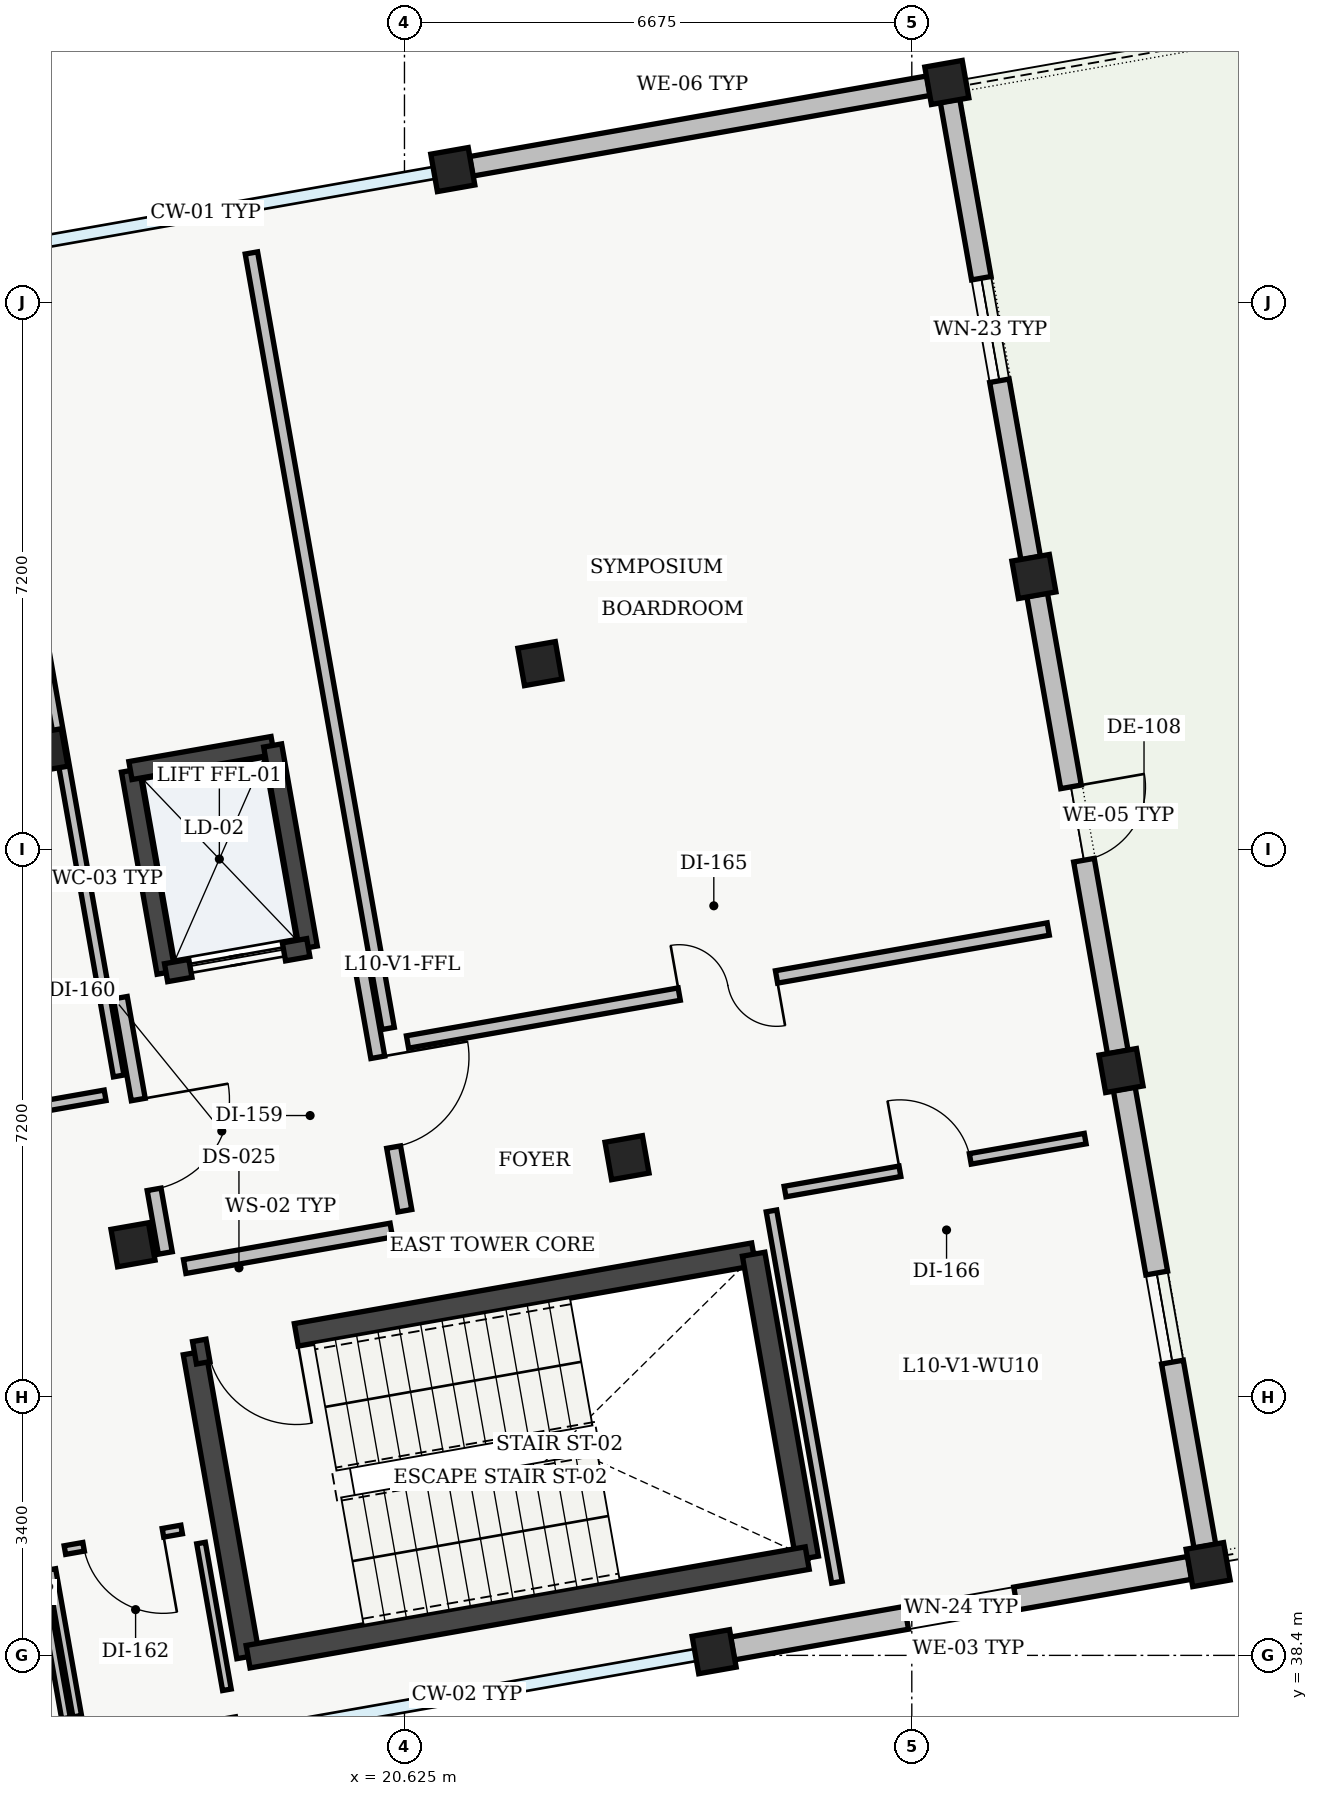
"""IFC4 building model, lengths in metres.
Left out: names, types, materials, properties, quantities, classifications, styles, units other than length and angle.
Written with IfcOpenShell. Run it as: python <this file> out.ifc"""

import sys

from ifc_helpers import new_model, si_unit, direction, frame, frame_2d, origin, origin_2d, place, context, subcontext, project, spatial, rectangle, extrude, element, fill, save


model = new_model("IFC4")
c1 = context("Model", 3, precision=1e-05, world=origin(), true_north=direction((0.0, 1.0)))
c2 = subcontext(c1, "Body", "Model", "MODEL_VIEW")
j1 = project(units=[si_unit("LENGTHUNIT", "METRE"), si_unit("PLANEANGLEUNIT", "RADIAN")], contexts=[c1])
p1 = place(None, origin())
s1 = spatial("IfcSite", under=j1, at=p1, CompositionType="ELEMENT")
p2 = place(p1, origin())
s2 = spatial("IfcBuilding", under=s1, at=p2, CompositionType="ELEMENT")
p3 = place(p2, frame((0.0, 0.0, 45.0)))
s3 = spatial("IfcBuildingStorey", under=s2, at=p3, CompositionType="ELEMENT", Elevation=45.0)
for number, where, z_axis, x_axis in (
    (1, (17.053, 43.802, 0.0), (0.0, 0.0, 1.0), (0.985, 0.174, 0.0)),
    (2, (15.907, 50.302, 0.0), (0.0, 0.0, 1.0), (0.985, 0.174, 0.0)),
    (3, (24.699, 38.448, 0.0), (0.0, 0.0, 1.0), (0.985, 0.174, 0.0)),
    (4, (23.553, 44.948, 0.0), (0.0, 0.0, 1.0), (0.985, 0.174, 0.0)),
    (5, (22.407, 51.448, 0.0), (0.0, 0.0, 1.0), (0.985, 0.174, 0.0)),
    (6, (21.261, 57.948, 0.0), (0.0, 0.0, 1.0), (0.985, 0.174, 0.0)),
    (7, (31.199, 39.594, 0.0), (0.0, 0.0, 1.0), (0.985, 0.174, 0.0)),
    (8, (30.053, 46.094, 0.0), (0.0, 0.0, 1.0), (0.985, 0.174, 0.0)),
    (9, (28.907, 52.594, 0.0), (0.0, 0.0, 1.0), (0.985, 0.174, 0.0)),
    (10, (27.761, 59.094, 0.0), (0.0, 0.0, 1.0), (0.985, 0.174, 0.0)),
):
    element("IfcColumn", number, at=place(p3, frame(where, z_axis=z_axis, x_axis=x_axis)), inside=s3, PredefinedType="COLUMN", context=c2, shape_type="SweptSolid", body=[
        extrude(rectangle(XDim=0.5, YDim=0.5, at=origin_2d()), origin(), (0.0, 0.0, 1.0), 4.02),
    ])
p4 = place(p3, frame((21.502, 57.99, 0.0), z_axis=(0.0, 0.0, 1.0), x_axis=(0.984807282173, 0.173650847905, 0.0)))
e11 = element("IfcWall", 11, at=p4, inside=s3, PredefinedType="STANDARD", context=c2, shape_type="SweptSolid", body=[
    extrude(rectangle(XDim=6.11, YDim=0.26, at=frame_2d((3.055, 0.0))), origin(), (0.0, 0.0, 1.0), 3.555),
])
p5 = place(p3, frame((27.803, 58.852, 0.0), z_axis=(0.0, 0.0, 1.0), x_axis=(0.173650847905, -0.984807282173, 0.0)))
e12 = element("IfcWall", 12, at=p5, inside=s3, PredefinedType="STANDARD", context=c2, shape_type="SweptSolid", body=[
    extrude(rectangle(XDim=6.11, YDim=0.26, at=frame_2d((3.055, 0.0))), origin(), (0.0, 0.0, 1.0), 3.555),
])
p6 = place(p5, frame((2.37, 0.0, 0.95)))
e13 = element("IfcOpeningElement", 13, at=p6, cuts=e12, PredefinedType="OPENING", context=c2, shape_type="SweptSolid", body=[
    extrude(rectangle(XDim=1.37, YDim=1.42, at=frame_2d((0.685, 0.71))), frame((0.0, 0.13, 0.0), z_axis=(0.0, -1.0, 0.0), x_axis=(1.0, 0.0, 0.0)), (0.0, 0.0, 1.0), 0.26),
])
p7 = place(p3, frame((28.949, 52.353, 0.0), z_axis=(0.0, 0.0, 1.0), x_axis=(0.173650847905, -0.984807282173, 0.0)))
e14 = element("IfcWall", 14, at=p7, inside=s3, PredefinedType="STANDARD", context=c2, shape_type="SweptSolid", body=[
    extrude(rectangle(XDim=6.11, YDim=0.275, at=frame_2d((3.055, 0.0))), origin(), (0.0, 0.0, 1.0), 3.555),
])
p8 = place(p7, frame((2.565, 0.0, 0.0)))
e15 = element("IfcOpeningElement", 15, at=p8, cuts=e14, PredefinedType="OPENING", context=c2, shape_type="SweptSolid", body=[
    extrude(rectangle(XDim=0.98, YDim=2.15, at=frame_2d((0.49, 1.075))), frame((0.0, 0.137, 0.0), z_axis=(0.0, -1.0, 0.0), x_axis=(1.0, 0.0, 0.0)), (0.0, 0.0, 1.0), 0.275),
])
p9 = place(p3, frame((30.095, 45.853, 0.0), z_axis=(0.0, 0.0, 1.0), x_axis=(0.173657681232, -0.98480607723, 0.0)))
e16 = element("IfcWall", 16, at=p9, inside=s3, PredefinedType="STANDARD", context=c2, shape_type="SweptSolid", body=[
    extrude(rectangle(XDim=6.11, YDim=0.29, at=frame_2d((3.055, 0.0))), origin(), (0.0, 0.0, 1.0), 3.555),
])
p10 = place(p9, frame((2.46, 0.0, 0.95)))
e17 = element("IfcOpeningElement", 17, at=p10, cuts=e16, PredefinedType="OPENING", context=c2, shape_type="SweptSolid", body=[
    extrude(rectangle(XDim=1.19, YDim=1.38, at=frame_2d((0.595, 0.69))), frame((0.0, 0.145, 0.0), z_axis=(0.0, -1.0, 0.0), x_axis=(1.0, 0.0, 0.0)), (0.0, 0.0, 1.0), 0.29),
])
p11 = place(p3, frame((30.958, 39.552, 0.0), z_axis=(0.0, 0.0, 1.0), x_axis=(-0.984807282173, -0.173650847905, 0.0)))
e18 = element("IfcWall", 18, at=p11, inside=s3, PredefinedType="STANDARD", context=c2, shape_type="SweptSolid", body=[
    extrude(rectangle(XDim=6.11, YDim=0.305, at=frame_2d((3.055, 0.0))), origin(), (0.0, 0.0, 1.0), 3.555),
])
p12 = place(p11, frame((2.325, 0.0, 0.95)))
e19 = element("IfcOpeningElement", 19, at=p12, cuts=e18, PredefinedType="OPENING", context=c2, shape_type="SweptSolid", body=[
    extrude(rectangle(XDim=1.46, YDim=1.44, at=frame_2d((0.73, 0.72))), frame((0.0, 0.152, 0.0), z_axis=(0.0, -1.0, 0.0), x_axis=(1.0, 0.0, 0.0)), (0.0, 0.0, 1.0), 0.305),
])
p13 = place(p3, frame((18.567, 38.383, 0.0), z_axis=(0.0, 0.0, 1.0), x_axis=(-0.173606946886, 0.984815022221, 0.0)))
e20 = element("IfcWall", 20, at=p13, inside=s3, PredefinedType="SHEAR", context=c2, shape_type="SweptSolid", body=[
    extrude(rectangle(XDim=4.06, YDim=0.3, at=frame_2d((2.03, 0.0))), origin(), (0.0, 0.0, 1.0), 3.98),
])
p14 = place(p3, frame((17.863, 42.381, 0.0), z_axis=(0.0, 0.0, 1.0), x_axis=(0.984808225754, 0.173645496596, 0.0)))
e21 = element("IfcWall", 21, at=p14, inside=s3, PredefinedType="SHEAR", context=c2, shape_type="SweptSolid", body=[
    extrude(rectangle(XDim=7.47, YDim=0.3, at=frame_2d((3.735, 0.0))), origin(), (0.0, 0.0, 1.0), 3.98),
])
p15 = place(p14, frame((0.18, 0.0, 0.0)))
e22 = element("IfcOpeningElement", 22, at=p15, cuts=e21, PredefinedType="OPENING", context=c2, shape_type="SweptSolid", body=[
    extrude(rectangle(XDim=1.18, YDim=2.15, at=frame_2d((0.59, 1.075))), frame((0.0, 0.15, 0.0), z_axis=(0.0, -1.0, 0.0), x_axis=(1.0, 0.0, 0.0)), (0.0, 0.0, 1.0), 0.3),
])
p16 = place(p3, frame((25.219, 43.678, 0.0), z_axis=(0.0, 0.0, 1.0), x_axis=(0.173665267602, -0.984804739443, 0.0)))
e23 = element("IfcWall", 23, at=p16, inside=s3, PredefinedType="SHEAR", context=c2, shape_type="SweptSolid", body=[
    extrude(rectangle(XDim=4.06, YDim=0.3, at=frame_2d((2.03, 0.0))), origin(), (0.0, 0.0, 1.0), 3.98),
])
p17 = place(p3, frame((25.924, 39.68, 0.0), z_axis=(0.0, 0.0, 1.0), x_axis=(-0.984809211193, -0.173639907711, 0.0)))
e24 = element("IfcWall", 24, at=p17, inside=s3, PredefinedType="SHEAR", context=c2, shape_type="SweptSolid", body=[
    extrude(rectangle(XDim=7.47, YDim=0.3, at=frame_2d((3.735, 0.0))), origin(), (0.0, 0.0, 1.0), 3.98),
])
p18 = place(p3, frame((17.488, 47.382, 0.0), z_axis=(0.0, 0.0, 1.0), x_axis=(-0.173615102578, 0.98481358447, 0.0)))
e25 = element("IfcWall", 25, at=p18, inside=s3, PredefinedType="SHEAR", context=c2, shape_type="SweptSolid", body=[
    extrude(rectangle(XDim=2.7, YDim=0.24, at=frame_2d((1.35, 0.0))), origin(), (0.0, 0.0, 1.0), 3.98),
])
p19 = place(p3, frame((17.02, 50.041, 0.0), z_axis=(0.0, 0.0, 1.0), x_axis=(0.984815882103, 0.173602068988, 0.0)))
e26 = element("IfcWall", 26, at=p19, inside=s3, PredefinedType="SHEAR", context=c2, shape_type="SweptSolid", body=[
    extrude(rectangle(XDim=1.9, YDim=0.24, at=frame_2d((0.95, 0.0))), origin(), (0.0, 0.0, 1.0), 3.98),
])
p20 = place(p3, frame((18.891, 50.371, 0.0), z_axis=(0.0, 0.0, 1.0), x_axis=(0.173615102578, -0.98481358447, 0.0)))
e27 = element("IfcWall", 27, at=p20, inside=s3, PredefinedType="SHEAR", context=c2, shape_type="SweptSolid", body=[
    extrude(rectangle(XDim=2.7, YDim=0.24, at=frame_2d((1.35, 0.0))), origin(), (0.0, 0.0, 1.0), 3.98),
])
p21 = place(p3, frame((19.359, 47.712, 0.0), z_axis=(0.0, 0.0, 1.0), x_axis=(-0.984815882103, -0.173602068988, 0.0)))
e28 = element("IfcWall", 28, at=p21, inside=s3, PredefinedType="SHEAR", context=c2, shape_type="SweptSolid", body=[
    extrude(rectangle(XDim=1.9, YDim=0.24, at=frame_2d((0.95, 0.0))), origin(), (0.0, 0.0, 1.0), 3.98),
])
p22 = place(p21, frame((0.325, 0.0, 0.0)))
e29 = element("IfcOpeningElement", 29, at=p22, cuts=e28, PredefinedType="OPENING", context=c2, shape_type="SweptSolid", body=[
    extrude(rectangle(XDim=1.25, YDim=2.2, at=frame_2d((0.625, 1.1))), frame((0.0, 0.12, 0.0), z_axis=(0.0, -1.0, 0.0), x_axis=(1.0, 0.0, 0.0)), (0.0, 0.0, 1.0), 0.24),
])
p23 = place(p3, frame((17.733, 43.516, 0.0), z_axis=(0.0, 0.0, 1.0), x_axis=(0.984808483292, 0.173644035992, 0.0)))
e30 = element("IfcWall", 30, at=p23, inside=s3, PredefinedType="SOLIDWALL", context=c2, shape_type="SweptSolid", body=[
    extrude(rectangle(XDim=2.76, YDim=0.185, at=frame_2d((1.38, 0.0))), origin(), (0.0, 0.0, 1.0), 3.65),
])
p24 = place(p3, frame((20.63, 44.25, 0.0), z_axis=(0.0, 0.0, 1.0), x_axis=(-0.173621956536, 0.984812376145, 0.0)))
e31 = element("IfcWall", 31, at=p24, inside=s3, PredefinedType="SOLIDWALL", context=c2, shape_type="SweptSolid", body=[
    extrude(rectangle(XDim=3.41, YDim=0.185, at=frame_2d((1.705, 0.0))), origin(), (0.0, 0.0, 1.0), 3.65),
])
p25 = place(p24, frame((0.85, 0.0, 0.0)))
e32 = element("IfcOpeningElement", 32, at=p25, cuts=e31, PredefinedType="OPENING", context=c2, shape_type="SweptSolid", body=[
    extrude(rectangle(XDim=1.2, YDim=2.15, at=frame_2d((0.6, 1.075))), frame((0.0, 0.093, 0.0), z_axis=(0.0, -1.0, 0.0), x_axis=(1.0, 0.0, 0.0)), (0.0, 0.0, 1.0), 0.185),
])
p26 = place(p3, frame((16.886, 47.052, 0.0), z_axis=(0.0, 0.0, 1.0), x_axis=(0.173621956536, -0.984812376145, 0.0)))
e33 = element("IfcWall", 33, at=p26, inside=s3, PredefinedType="SOLIDWALL", context=c2, shape_type="SweptSolid", body=[
    extrude(rectangle(XDim=3.41, YDim=0.185, at=frame_2d((1.705, 0.0))), origin(), (0.0, 0.0, 1.0), 3.65),
])
p27 = place(p26, frame((1.36, 0.0, 0.0)))
e34 = element("IfcOpeningElement", 34, at=p27, cuts=e33, PredefinedType="OPENING", context=c2, shape_type="SweptSolid", body=[
    extrude(rectangle(XDim=1.2, YDim=2.15, at=frame_2d((0.6, 1.075))), frame((0.0, 0.093, 0.0), z_axis=(0.0, -1.0, 0.0), x_axis=(1.0, 0.0, 0.0)), (0.0, 0.0, 1.0), 0.185),
])
p28 = place(p3, frame((16.171, 37.574, 0.0), z_axis=(0.0, 0.0, 1.0), x_axis=(-0.173644490041, 0.984808403233, 0.0)))
e35 = element("IfcWall", 35, at=p28, inside=s3, PredefinedType="PARTITIONING", context=c2, shape_type="SweptSolid", body=[
    extrude(rectangle(XDim=3.56, YDim=0.115, at=frame_2d((1.78, 0.0))), origin(), (0.0, 0.0, 1.0), 3.65),
])
p29 = place(p3, frame((18.289, 37.948, 0.0), z_axis=(0.0, 0.0, 1.0), x_axis=(-0.173643211285, 0.984808628706, 0.0)))
e36 = element("IfcWall", 36, at=p29, inside=s3, PredefinedType="PARTITIONING", context=c2, shape_type="SweptSolid", body=[
    extrude(rectangle(XDim=1.96, YDim=0.115, at=frame_2d((0.98, 0.0))), origin(), (0.0, 0.0, 1.0), 3.455),
])
p30 = place(p3, frame((17.694, 40.056, 0.0), z_axis=(0.0, 0.0, 1.0), x_axis=(-0.984797734253, -0.173704987291, 0.0)))
e37 = element("IfcWall", 37, at=p30, inside=s3, PredefinedType="PARTITIONING", context=c2, shape_type="SweptSolid", body=[
    extrude(rectangle(XDim=1.56, YDim=0.115, at=frame_2d((0.78, 0.0))), origin(), (0.0, 0.0, 1.0), 3.65),
])
p31 = place(p30, frame((0.25, 0.0, 0.0)))
e38 = element("IfcOpeningElement", 38, at=p31, cuts=e37, PredefinedType="OPENING", context=c2, shape_type="SweptSolid", body=[
    extrude(rectangle(XDim=1.06, YDim=2.12, at=frame_2d((0.53, 1.06))), frame((0.0, 0.058, 0.0), z_axis=(0.0, -1.0, 0.0), x_axis=(1.0, 0.0, 0.0)), (0.0, 0.0, 1.0), 0.115),
])
p32 = place(p3, frame((15.979, 39.53, 0.0), z_axis=(0.0, 0.0, 1.0), x_axis=(0.173643211285, -0.984808628706, 0.0)))
e39 = element("IfcWall", 39, at=p32, inside=s3, PredefinedType="PARTITIONING", context=c2, shape_type="SweptSolid", body=[
    extrude(rectangle(XDim=1.96, YDim=0.115, at=frame_2d((0.98, 0.0))), origin(), (0.0, 0.0, 1.0), 3.65),
])
p33 = place(p3, frame((10.423, 44.664, 0.0), z_axis=(0.0, 0.0, 1.0), x_axis=(0.984804420334, 0.173667077165, 0.0)))
e40 = element("IfcWall", 40, at=p33, inside=s3, PredefinedType="PARTITIONING", context=c2, shape_type="SweptSolid", body=[
    extrude(rectangle(XDim=6.36, YDim=0.14, at=frame_2d((3.18, 0.0))), origin(), (0.0, 0.0, 1.0), 3.65),
])
p34 = place(p33, frame((2.71, 0.0, 0.0)))
e41 = element("IfcOpeningElement", 41, at=p34, cuts=e40, PredefinedType="OPENING", context=c2, shape_type="SweptSolid", body=[
    extrude(rectangle(XDim=0.94, YDim=2.12, at=frame_2d((0.47, 1.06))), frame((0.0, 0.07, 0.0), z_axis=(0.0, -1.0, 0.0), x_axis=(1.0, 0.0, 0.0)), (0.0, 0.0, 1.0), 0.14),
])
p35 = place(p3, frame((16.865, 46.023, 0.0), z_axis=(0.0, 0.0, 1.0), x_axis=(-0.173632075677, 0.984810592092, 0.0)))
e42 = element("IfcWall", 42, at=p35, inside=s3, PredefinedType="PARTITIONING", context=c2, shape_type="SweptSolid", body=[
    extrude(rectangle(XDim=10.36, YDim=0.14, at=frame_2d((5.18, 0.0))), origin(), (0.0, 0.0, 1.0), 3.455),
])
p36 = place(p3, frame((20.665, 46.469, 0.0), z_axis=(0.0, 0.0, 1.0), x_axis=(0.984804798714, 0.173664931489, 0.0)))
e43 = element("IfcWall", 43, at=p36, inside=s3, PredefinedType="PARTITIONING", context=c2, shape_type="SweptSolid", body=[
    extrude(rectangle(XDim=8.56, YDim=0.165, at=frame_2d((4.28, 0.0))), origin(), (0.0, 0.0, 1.0), 3.65),
])
p37 = place(p36, frame((3.63, 0.0, 0.0)))
e44 = element("IfcOpeningElement", 44, at=p37, cuts=e43, PredefinedType="OPENING", context=c2, shape_type="SweptSolid", body=[
    extrude(rectangle(XDim=1.3, YDim=2.18, at=frame_2d((0.65, 1.09))), frame((0.0, 0.083, 0.0), z_axis=(0.0, -1.0, 0.0), x_axis=(1.0, 0.0, 0.0)), (0.0, 0.0, 1.0), 0.165),
])
p38 = place(p3, frame((18.611, 56.851, 0.0), z_axis=(0.0, 0.0, 1.0), x_axis=(0.173654930775, -0.984806562233, 0.0)))
e45 = element("IfcWall", 45, at=p38, inside=s3, PredefinedType="PARTITIONING", context=c2, shape_type="SweptSolid", body=[
    extrude(rectangle(XDim=10.36, YDim=0.165, at=frame_2d((5.18, 0.0))), origin(), (0.0, 0.0, 1.0), 3.65),
])
p39 = place(p3, frame((29.581, 45.198, 0.0), z_axis=(0.0, 0.0, 1.0), x_axis=(-0.984810514369, -0.173632516505, 0.0)))
e46 = element("IfcWall", 46, at=p39, inside=s3, PredefinedType="PARTITIONING", context=c2, shape_type="SweptSolid", body=[
    extrude(rectangle(XDim=4.01, YDim=0.14, at=frame_2d((2.005, 0.0))), origin(), (0.0, 0.0, 1.0), 3.65),
])
p40 = place(p39, frame((1.535, 0.0, 0.0)))
e47 = element("IfcOpeningElement", 47, at=p40, cuts=e46, PredefinedType="OPENING", context=c2, shape_type="SweptSolid", body=[
    extrude(rectangle(XDim=0.94, YDim=2.12, at=frame_2d((0.47, 1.06))), frame((0.0, 0.07, 0.0), z_axis=(0.0, -1.0, 0.0), x_axis=(1.0, 0.0, 0.0)), (0.0, 0.0, 1.0), 0.14),
])
p41 = place(p3, frame((25.454, 44.247, 0.0), z_axis=(0.0, 0.0, 1.0), x_axis=(0.173658971256, -0.98480584975, 0.0)))
e48 = element("IfcWall", 48, at=p41, inside=s3, PredefinedType="PARTITIONING", context=c2, shape_type="SweptSolid", body=[
    extrude(rectangle(XDim=4.96, YDim=0.14, at=frame_2d((2.48, 0.0))), origin(), (0.0, 0.0, 1.0), 3.65),
])
p42 = place(p6, origin())
e49 = element("IfcWindow", 49, at=p42, inside=s3, PartitioningType="SINGLE_PANEL", PredefinedType="WINDOW", context=c2, shape_type="SweptSolid", body=[
    extrude(rectangle(XDim=1.37, YDim=1.42, at=frame_2d((0.685, 0.71))), frame((0.0, 0.03, 0.0), z_axis=(0.0, -1.0, 0.0), x_axis=(1.0, 0.0, 0.0)), (0.0, 0.0, 1.0), 0.06),
])
fill(e13, e49)
p43 = place(p8, origin())
e50 = element("IfcDoor", 50, at=p43, inside=s3, OperationType="SINGLE_SWING_LEFT", PredefinedType="DOOR", context=c2, shape_type="SweptSolid", body=[
    extrude(rectangle(XDim=0.98, YDim=2.15, at=frame_2d((0.49, 1.075))), frame((0.0, 0.025, 0.0), z_axis=(0.0, -1.0, 0.0), x_axis=(1.0, 0.0, 0.0)), (0.0, 0.0, 1.0), 0.05),
])
fill(e15, e50)
p44 = place(p10, origin())
e51 = element("IfcWindow", 51, at=p44, inside=s3, PartitioningType="SINGLE_PANEL", PredefinedType="WINDOW", context=c2, shape_type="SweptSolid", body=[
    extrude(rectangle(XDim=1.19, YDim=1.38, at=frame_2d((0.595, 0.69))), frame((0.0, 0.03, 0.0), z_axis=(0.0, -1.0, 0.0), x_axis=(1.0, 0.0, 0.0)), (0.0, 0.0, 1.0), 0.06),
])
fill(e17, e51)
p45 = place(p12, origin())
e52 = element("IfcWindow", 52, at=p45, inside=s3, PartitioningType="SINGLE_PANEL", PredefinedType="WINDOW", context=c2, shape_type="SweptSolid", body=[
    extrude(rectangle(XDim=1.46, YDim=1.44, at=frame_2d((0.73, 0.72))), frame((0.0, 0.03, 0.0), z_axis=(0.0, -1.0, 0.0), x_axis=(1.0, 0.0, 0.0)), (0.0, 0.0, 1.0), 0.06),
])
fill(e19, e52)
p46 = place(p15, origin())
e53 = element("IfcDoor", 53, at=p46, inside=s3, OperationType="SINGLE_SWING_RIGHT", PredefinedType="DOOR", context=c2, shape_type="SweptSolid", body=[
    extrude(rectangle(XDim=1.18, YDim=2.15, at=frame_2d((0.59, 1.075))), frame((0.0, 0.025, 0.0), z_axis=(0.0, -1.0, 0.0), x_axis=(1.0, 0.0, 0.0)), (0.0, 0.0, 1.0), 0.05),
])
fill(e22, e53)
p47 = place(p22, origin())
e54 = element("IfcDoor", 54, at=p47, inside=s3, OperationType="SLIDING_TO_RIGHT", PredefinedType="DOOR", context=c2, shape_type="SweptSolid", body=[
    extrude(rectangle(XDim=1.25, YDim=2.2, at=frame_2d((0.625, 1.1))), frame((0.0, 0.025, 0.0), z_axis=(0.0, -1.0, 0.0), x_axis=(1.0, 0.0, 0.0)), (0.0, 0.0, 1.0), 0.05),
])
fill(e29, e54)
p48 = place(p25, origin())
e55 = element("IfcDoor", 55, at=p48, inside=s3, OperationType="SINGLE_SWING_RIGHT", PredefinedType="DOOR", context=c2, shape_type="SweptSolid", body=[
    extrude(rectangle(XDim=1.2, YDim=2.15, at=frame_2d((0.6, 1.075))), frame((0.0, 0.025, 0.0), z_axis=(0.0, -1.0, 0.0), x_axis=(1.0, 0.0, 0.0)), (0.0, 0.0, 1.0), 0.05),
])
fill(e32, e55)
p49 = place(p27, origin())
e56 = element("IfcDoor", 56, at=p49, inside=s3, OperationType="SINGLE_SWING_LEFT", PredefinedType="DOOR", context=c2, shape_type="SweptSolid", body=[
    extrude(rectangle(XDim=1.2, YDim=2.15, at=frame_2d((0.6, 1.075))), frame((0.0, 0.025, 0.0), z_axis=(0.0, -1.0, 0.0), x_axis=(1.0, 0.0, 0.0)), (0.0, 0.0, 1.0), 0.05),
])
fill(e34, e56)
p50 = place(p31, origin())
e57 = element("IfcDoor", 57, at=p50, inside=s3, OperationType="SINGLE_SWING_LEFT", PredefinedType="DOOR", context=c2, shape_type="SweptSolid", body=[
    extrude(rectangle(XDim=1.06, YDim=2.12, at=frame_2d((0.53, 1.06))), frame((0.0, 0.025, 0.0), z_axis=(0.0, -1.0, 0.0), x_axis=(1.0, 0.0, 0.0)), (0.0, 0.0, 1.0), 0.05),
])
fill(e38, e57)
p51 = place(p37, origin())
e58 = element("IfcDoor", 58, at=p51, inside=s3, OperationType="DOUBLE_DOOR_SINGLE_SWING", PredefinedType="DOOR", context=c2, shape_type="SweptSolid", body=[
    extrude(rectangle(XDim=1.3, YDim=2.18, at=frame_2d((0.65, 1.09))), frame((0.0, 0.025, 0.0), z_axis=(0.0, -1.0, 0.0), x_axis=(1.0, 0.0, 0.0)), (0.0, 0.0, 1.0), 0.05),
])
fill(e44, e58)
p52 = place(p40, origin())
e59 = element("IfcDoor", 59, at=p52, inside=s3, OperationType="SINGLE_SWING_RIGHT", PredefinedType="DOOR", context=c2, shape_type="SweptSolid", body=[
    extrude(rectangle(XDim=0.94, YDim=2.12, at=frame_2d((0.47, 1.06))), frame((0.0, 0.025, 0.0), z_axis=(0.0, -1.0, 0.0), x_axis=(1.0, 0.0, 0.0)), (0.0, 0.0, 1.0), 0.05),
])
fill(e47, e59)
save(model, sys.argv[1])
